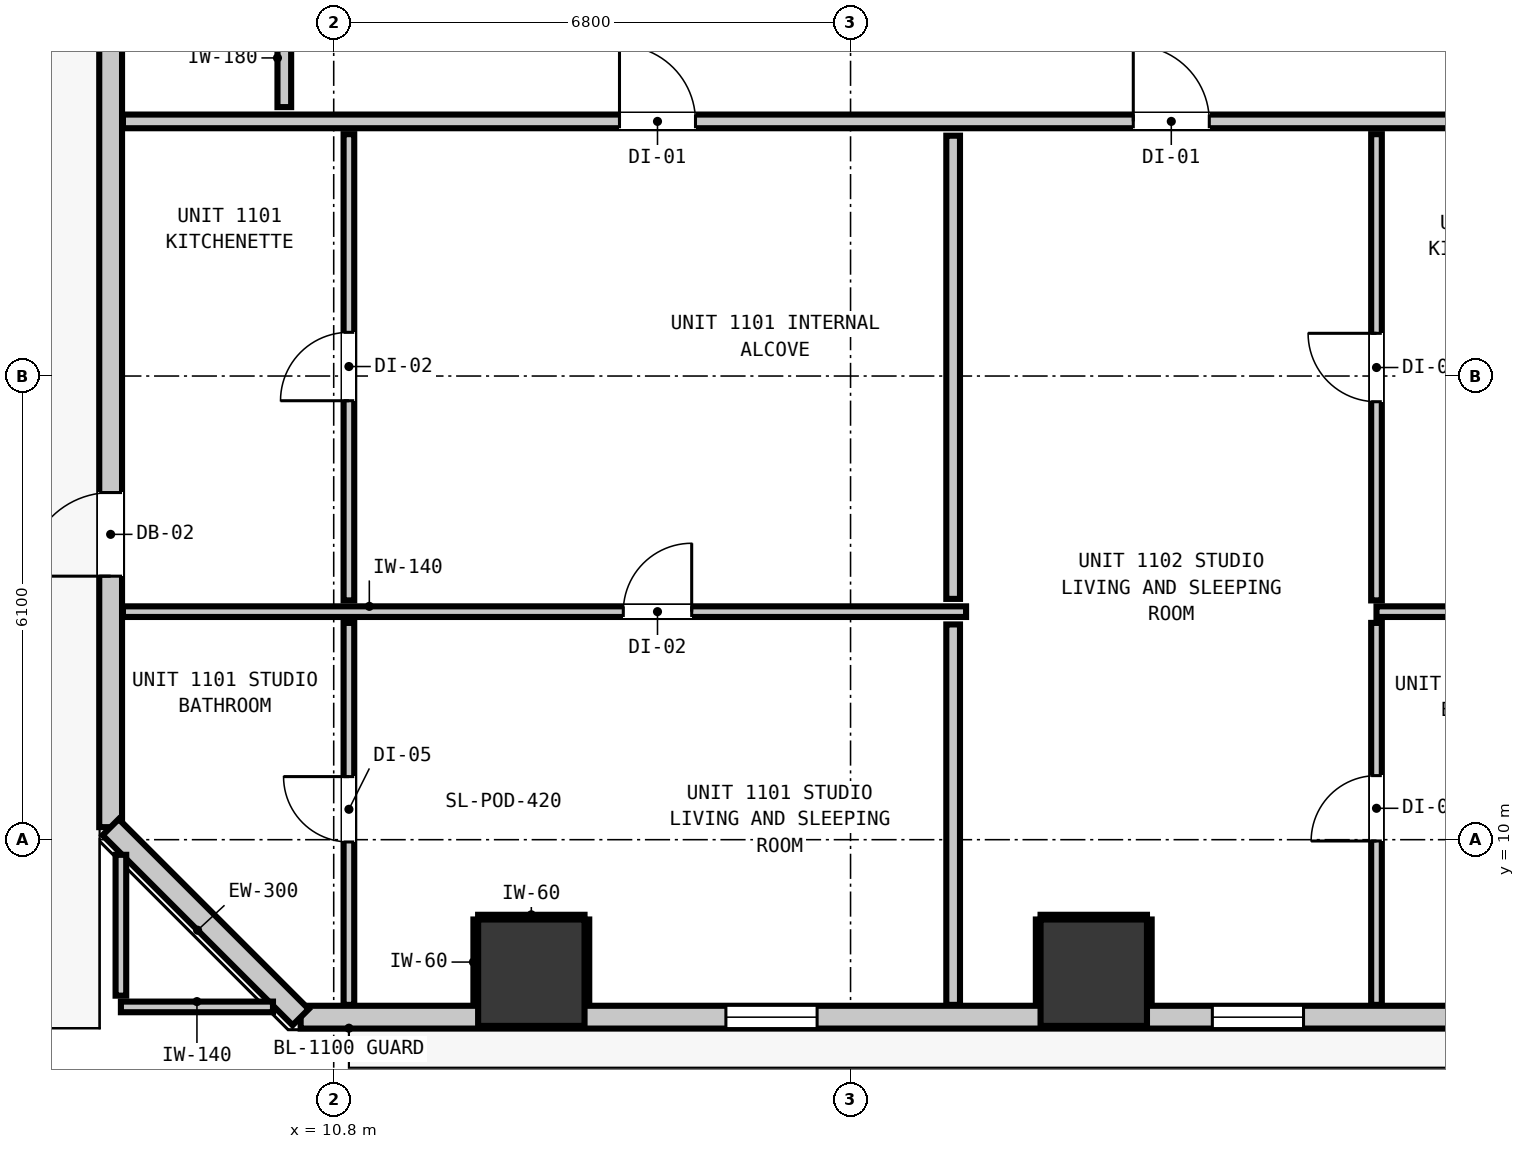
"""IFC4 building model, lengths in metres.
Left out: names, types, materials, properties, quantities, classifications, styles, units other than length and angle.
Written with IfcOpenShell. Run it as: python <this file> out.ifc"""

import sys

from ifc_helpers import new_model, si_unit, direction, frame, frame_2d, origin, origin_2d, place, context, subcontext, project, spatial, rectangle, extrude, element, fill, save


model = new_model("IFC4")
c1 = context("Model", 3, precision=1e-05, world=origin(), true_north=direction((0.0, 1.0)))
c2 = subcontext(c1, "Body", "Model", "MODEL_VIEW")
j1 = project(units=[si_unit("LENGTHUNIT", "METRE"), si_unit("PLANEANGLEUNIT", "RADIAN")], contexts=[c1])
p1 = place(None, origin())
s1 = spatial("IfcSite", under=j1, at=p1, CompositionType="ELEMENT")
p2 = place(p1, origin())
s2 = spatial("IfcBuilding", under=s1, at=p2, CompositionType="ELEMENT")
p3 = place(p2, frame((0.0, 0.0, 41.92)))
s3 = spatial("IfcBuildingStorey", under=s2, at=p3, CompositionType="ELEMENT", Elevation=41.92)
for number, where, z_axis, x_axis in (
    (1, (13.4, 8.25, -0.2), (0.0, 0.0, 1.0), (1.0, 0.0, 0.0)),
    (2, (20.8, 8.25, -0.2), (0.0, 0.0, 1.0), (1.0, 0.0, 0.0)),
):
    element("IfcColumn", number, at=place(p3, frame(where, z_axis=z_axis, x_axis=x_axis)), inside=s3, PredefinedType="COLUMN", context=c2, shape_type="SweptSolid", body=[
        extrude(rectangle(XDim=1.4, YDim=1.4, at=origin_2d()), origin(), (0.0, 0.0, 1.0), 3.52),
    ])
p4 = place(p3, frame((7.865, 10.165, 0.0), z_axis=(0.0, 0.0, 1.0), x_axis=(0.0, 1.0, 0.0)))
e3 = element("IfcWall", 3, at=p4, inside=s3, PredefinedType="STANDARD", context=c2, shape_type="SweptSolid", body=[
    extrude(rectangle(XDim=34.67, YDim=0.3, at=frame_2d((17.335, 0.0))), origin(), (0.0, 0.0, 1.0), 3.06),
])
p5 = place(p4, frame((3.302, 0.0, 0.0)))
e4 = element("IfcOpeningElement", 4, at=p5, cuts=e3, PredefinedType="OPENING", context=c2, shape_type="SweptSolid", body=[
    extrude(rectangle(XDim=1.1, YDim=2.15, at=frame_2d((0.55, 1.075))), frame((0.0, 0.16, 0.0), z_axis=(0.0, -1.0, 0.0), x_axis=(1.0, 0.0, 0.0)), (0.0, 0.0, 1.0), 0.32),
])
p6 = place(p3, frame((47.835, 7.665, 0.0), z_axis=(0.0, 0.0, 1.0), x_axis=(-1.0, 0.0, 0.0)))
e5 = element("IfcWall", 5, at=p6, inside=s3, PredefinedType="STANDARD", context=c2, shape_type="SweptSolid", body=[
    extrude(rectangle(XDim=37.47, YDim=0.3, at=frame_2d((18.735, 0.0))), origin(), (0.0, 0.0, 1.0), 3.06),
])
p7 = place(p6, frame((1.251, 0.0, 0.0)))
e6 = element("IfcOpeningElement", 6, at=p7, cuts=e5, PredefinedType="OPENING", context=c2, shape_type="SweptSolid", body=[
    extrude(rectangle(XDim=1.0, YDim=2.15, at=frame_2d((0.5, 1.075))), frame((0.0, 0.16, 0.0), z_axis=(0.0, -1.0, 0.0), x_axis=(1.0, 0.0, 0.0)), (0.0, 0.0, 1.0), 0.32),
])
p8 = place(p6, frame((30.675, 0.0, 0.85)))
e7 = element("IfcOpeningElement", 7, at=p8, cuts=e5, PredefinedType="OPENING", context=c2, shape_type="SweptSolid", body=[
    extrude(rectangle(XDim=1.2, YDim=1.8, at=frame_2d((0.6, 0.9))), frame((0.0, 0.16, 0.0), z_axis=(0.0, -1.0, 0.0), x_axis=(1.0, 0.0, 0.0)), (0.0, 0.0, 1.0), 0.32),
])
p9 = place(p6, frame((24.275, 0.0, 0.85)))
e8 = element("IfcOpeningElement", 8, at=p9, cuts=e5, PredefinedType="OPENING", context=c2, shape_type="SweptSolid", body=[
    extrude(rectangle(XDim=1.2, YDim=1.8, at=frame_2d((0.6, 0.9))), frame((0.0, 0.16, 0.0), z_axis=(0.0, -1.0, 0.0), x_axis=(1.0, 0.0, 0.0)), (0.0, 0.0, 1.0), 0.32),
])
p10 = place(p6, frame((14.269, 0.0, 0.85)))
e9 = element("IfcOpeningElement", 9, at=p10, cuts=e5, PredefinedType="OPENING", context=c2, shape_type="SweptSolid", body=[
    extrude(rectangle(XDim=1.2, YDim=1.8, at=frame_2d((0.6, 0.9))), frame((0.0, 0.16, 0.0), z_axis=(0.0, -1.0, 0.0), x_axis=(1.0, 0.0, 0.0)), (0.0, 0.0, 1.0), 0.32),
])
p11 = place(p6, frame((17.139, 0.0, 0.85)))
e10 = element("IfcOpeningElement", 10, at=p11, cuts=e5, PredefinedType="OPENING", context=c2, shape_type="SweptSolid", body=[
    extrude(rectangle(XDim=0.58, YDim=1.5, at=frame_2d((0.29, 0.75))), frame((0.0, 0.16, 0.0), z_axis=(0.0, -1.0, 0.0), x_axis=(1.0, 0.0, 0.0)), (0.0, 0.0, 1.0), 0.32),
])
p12 = place(p6, frame((9.356, 0.0, 0.85)))
e11 = element("IfcOpeningElement", 11, at=p12, cuts=e5, PredefinedType="OPENING", context=c2, shape_type="SweptSolid", body=[
    extrude(rectangle(XDim=1.05, YDim=1.65, at=frame_2d((0.525, 0.825))), frame((0.0, 0.16, 0.0), z_axis=(0.0, -1.0, 0.0), x_axis=(1.0, 0.0, 0.0)), (0.0, 0.0, 1.0), 0.32),
])
p13 = place(p6, frame((5.089, 0.0, 0.85)))
e12 = element("IfcOpeningElement", 12, at=p13, cuts=e5, PredefinedType="OPENING", context=c2, shape_type="SweptSolid", body=[
    extrude(rectangle(XDim=1.2, YDim=1.8, at=frame_2d((0.6, 0.9))), frame((0.0, 0.16, 0.0), z_axis=(0.0, -1.0, 0.0), x_axis=(1.0, 0.0, 0.0)), (0.0, 0.0, 1.0), 0.32),
])
p14 = place(p3, frame((10.365, 7.665, 0.0), z_axis=(0.0, 0.0, 1.0), x_axis=(-0.707106781187, 0.707106781187, 0.0)))
e13 = element("IfcWall", 13, at=p14, inside=s3, PredefinedType="STANDARD", context=c2, shape_type="SweptSolid", body=[
    extrude(rectangle(XDim=3.536, YDim=0.3, at=frame_2d((1.768, 0.0))), origin(), (0.0, 0.0, 1.0), 3.06),
])
p15 = place(p3, frame((8.027, 19.45, 0.0), z_axis=(0.0, 0.0, 1.0), x_axis=(1.0, 0.0, 0.0)))
e14 = element("IfcWall", 14, at=p15, inside=s3, PredefinedType="PARTITIONING", context=c2, shape_type="SweptSolid", body=[
    extrude(rectangle(XDim=42.146, YDim=0.18, at=frame_2d((21.073, 0.0))), origin(), (0.0, 0.0, 1.0), 3.06),
])
p16 = place(p15, frame((6.533, 0.0, 0.0)))
e15 = element("IfcOpeningElement", 15, at=p16, cuts=e14, PredefinedType="OPENING", context=c2, shape_type="SweptSolid", body=[
    extrude(rectangle(XDim=1.0, YDim=2.15, at=frame_2d((0.5, 1.075))), frame((0.0, 0.1, 0.0), z_axis=(0.0, -1.0, 0.0), x_axis=(1.0, 0.0, 0.0)), (0.0, 0.0, 1.0), 0.2),
])
p17 = place(p15, frame((13.293, 0.0, 0.0)))
e16 = element("IfcOpeningElement", 16, at=p17, cuts=e14, PredefinedType="OPENING", context=c2, shape_type="SweptSolid", body=[
    extrude(rectangle(XDim=1.0, YDim=2.15, at=frame_2d((0.5, 1.075))), frame((0.0, 0.1, 0.0), z_axis=(0.0, -1.0, 0.0), x_axis=(1.0, 0.0, 0.0)), (0.0, 0.0, 1.0), 0.2),
])
p18 = place(p15, frame((24.439, 0.0, 0.0)))
e17 = element("IfcOpeningElement", 17, at=p18, cuts=e14, PredefinedType="OPENING", context=c2, shape_type="SweptSolid", body=[
    extrude(rectangle(XDim=1.0, YDim=2.15, at=frame_2d((0.5, 1.075))), frame((0.0, 0.1, 0.0), z_axis=(0.0, -1.0, 0.0), x_axis=(1.0, 0.0, 0.0)), (0.0, 0.0, 1.0), 0.2),
])
p19 = place(p15, frame((34.477, 0.0, 0.0)))
e18 = element("IfcOpeningElement", 18, at=p19, cuts=e14, PredefinedType="OPENING", context=c2, shape_type="SweptSolid", body=[
    extrude(rectangle(XDim=1.0, YDim=2.15, at=frame_2d((0.5, 1.075))), frame((0.0, 0.1, 0.0), z_axis=(0.0, -1.0, 0.0), x_axis=(1.0, 0.0, 0.0)), (0.0, 0.0, 1.0), 0.2),
])
p20 = place(p3, frame((8.0, 7.8, 0.0), z_axis=(0.0, 0.0, 1.0), x_axis=(1.0, 0.0, 0.0)))
e19 = element("IfcWall", 19, at=p20, inside=s3, PredefinedType="PARTITIONING", context=c2, shape_type="SweptSolid", body=[
    extrude(rectangle(XDim=2.001, YDim=0.14, at=frame_2d((1.0, 0.0))), origin(), (0.0, 0.0, 1.0), 3.06),
])
p21 = place(p3, frame((8.027, 13.0, 0.0), z_axis=(0.0, 0.0, 1.0), x_axis=(1.0, 0.0, 0.0)))
e20 = element("IfcWall", 20, at=p21, inside=s3, PredefinedType="PARTITIONING", context=c2, shape_type="SweptSolid", body=[
    extrude(rectangle(XDim=11.093, YDim=0.14, at=frame_2d((5.546, 0.0))), origin(), (0.0, 0.0, 1.0), 3.06),
])
p22 = place(p21, frame((6.583, 0.0, 0.0)))
e21 = element("IfcOpeningElement", 21, at=p22, cuts=e20, PredefinedType="OPENING", context=c2, shape_type="SweptSolid", body=[
    extrude(rectangle(XDim=0.9, YDim=2.1, at=frame_2d((0.45, 1.05))), frame((0.0, 0.08, 0.0), z_axis=(0.0, -1.0, 0.0), x_axis=(1.0, 0.0, 0.0)), (0.0, 0.0, 1.0), 0.16),
])
p23 = place(p3, frame((24.52, 13.0, 0.0), z_axis=(0.0, 0.0, 1.0), x_axis=(1.0, 0.0, 0.0)))
e22 = element("IfcWall", 22, at=p23, inside=s3, PredefinedType="PARTITIONING", context=c2, shape_type="SweptSolid", body=[
    extrude(rectangle(XDim=6.492, YDim=0.14, at=frame_2d((3.246, 0.0))), origin(), (0.0, 0.0, 1.0), 3.06),
])
p24 = place(p3, frame((10.15, 19.638, 0.0), z_axis=(0.0, 0.0, 1.0), x_axis=(0.0, 1.0, 0.0)))
e23 = element("IfcWall", 23, at=p24, inside=s3, PredefinedType="PARTITIONING", context=c2, shape_type="SweptSolid", body=[
    extrude(rectangle(XDim=1.294, YDim=0.18, at=frame_2d((0.647, 0.0))), origin(), (0.0, 0.0, 1.0), 3.06),
])
p25 = place(p3, frame((18.95, 7.827, 0.0), z_axis=(0.0, 0.0, 1.0), x_axis=(0.0, 1.0, 0.0)))
e24 = element("IfcWall", 24, at=p25, inside=s3, PredefinedType="PARTITIONING", context=c2, shape_type="SweptSolid", body=[
    extrude(rectangle(XDim=5.005, YDim=0.18, at=frame_2d((2.502, 0.0))), origin(), (0.0, 0.0, 1.0), 3.06),
])
p26 = place(p3, frame((18.95, 13.168, 0.0), z_axis=(0.0, 0.0, 1.0), x_axis=(0.0, 1.0, 0.0)))
e25 = element("IfcWall", 25, at=p26, inside=s3, PredefinedType="PARTITIONING", context=c2, shape_type="SweptSolid", body=[
    extrude(rectangle(XDim=6.094, YDim=0.18, at=frame_2d((3.047, 0.0))), origin(), (0.0, 0.0, 1.0), 3.06),
])
p27 = place(p3, frame((8.0, 7.948, 0.0), z_axis=(0.0, 0.0, 1.0), x_axis=(0.0, 1.0, 0.0)))
e26 = element("IfcWall", 26, at=p27, inside=s3, PredefinedType="PARTITIONING", context=c2, shape_type="SweptSolid", body=[
    extrude(rectangle(XDim=1.853, YDim=0.14, at=frame_2d((0.927, 0.0))), origin(), (0.0, 0.0, 1.0), 3.06),
])
p28 = place(p3, frame((11.0, 7.827, 0.0), z_axis=(0.0, 0.0, 1.0), x_axis=(0.0, 1.0, 0.0)))
e27 = element("IfcWall", 27, at=p28, inside=s3, PredefinedType="PARTITIONING", context=c2, shape_type="SweptSolid", body=[
    extrude(rectangle(XDim=5.025, YDim=0.14, at=frame_2d((2.513, 0.0))), origin(), (0.0, 0.0, 1.0), 3.06),
])
p29 = place(p28, frame((2.143, 0.0, 0.0)))
e28 = element("IfcOpeningElement", 28, at=p29, cuts=e27, PredefinedType="OPENING", context=c2, shape_type="SweptSolid", body=[
    extrude(rectangle(XDim=0.86, YDim=2.02, at=frame_2d((0.43, 1.01))), frame((0.0, 0.08, 0.0), z_axis=(0.0, -1.0, 0.0), x_axis=(1.0, 0.0, 0.0)), (0.0, 0.0, 1.0), 0.16),
])
p30 = place(p3, frame((11.0, 13.148, 0.0), z_axis=(0.0, 0.0, 1.0), x_axis=(0.0, 1.0, 0.0)))
e29 = element("IfcWall", 29, at=p30, inside=s3, PredefinedType="PARTITIONING", context=c2, shape_type="SweptSolid", body=[
    extrude(rectangle(XDim=6.134, YDim=0.14, at=frame_2d((3.067, 0.0))), origin(), (0.0, 0.0, 1.0), 2.445),
])
p31 = place(p30, frame((2.627, 0.0, 0.0)))
e30 = element("IfcOpeningElement", 30, at=p31, cuts=e29, PredefinedType="OPENING", context=c2, shape_type="SweptSolid", body=[
    extrude(rectangle(XDim=0.9, YDim=2.1, at=frame_2d((0.45, 1.05))), frame((0.0, 0.08, 0.0), z_axis=(0.0, -1.0, 0.0), x_axis=(1.0, 0.0, 0.0)), (0.0, 0.0, 1.0), 0.16),
])
p32 = place(p3, frame((24.52, 7.827, 0.0), z_axis=(0.0, 0.0, 1.0), x_axis=(0.0, 1.0, 0.0)))
e31 = element("IfcWall", 31, at=p32, inside=s3, PredefinedType="PARTITIONING", context=c2, shape_type="SweptSolid", body=[
    extrude(rectangle(XDim=5.025, YDim=0.14, at=frame_2d((2.513, 0.0))), origin(), (0.0, 0.0, 1.0), 3.06),
])
p33 = place(p32, frame((2.156, 0.0, 0.0)))
e32 = element("IfcOpeningElement", 32, at=p33, cuts=e31, PredefinedType="OPENING", context=c2, shape_type="SweptSolid", body=[
    extrude(rectangle(XDim=0.86, YDim=2.02, at=frame_2d((0.43, 1.01))), frame((0.0, 0.08, 0.0), z_axis=(0.0, -1.0, 0.0), x_axis=(1.0, 0.0, 0.0)), (0.0, 0.0, 1.0), 0.16),
])
p34 = place(p3, frame((24.52, 13.148, 0.0), z_axis=(0.0, 0.0, 1.0), x_axis=(0.0, 1.0, 0.0)))
e33 = element("IfcWall", 33, at=p34, inside=s3, PredefinedType="PARTITIONING", context=c2, shape_type="SweptSolid", body=[
    extrude(rectangle(XDim=6.134, YDim=0.14, at=frame_2d((3.067, 0.0))), origin(), (0.0, 0.0, 1.0), 3.06),
])
p35 = place(p34, frame((2.614, 0.0, 0.0)))
e34 = element("IfcOpeningElement", 34, at=p35, cuts=e33, PredefinedType="OPENING", context=c2, shape_type="SweptSolid", body=[
    extrude(rectangle(XDim=0.9, YDim=2.1, at=frame_2d((0.45, 1.05))), frame((0.0, 0.08, 0.0), z_axis=(0.0, -1.0, 0.0), x_axis=(1.0, 0.0, 0.0)), (0.0, 0.0, 1.0), 0.16),
])
p36 = place(p3, frame((12.7, 8.982, 0.0), z_axis=(0.0, 0.0, 1.0), x_axis=(1.0, 0.0, 0.0)))
e35 = element("IfcWall", 35, at=p36, inside=s3, PredefinedType="PARTITIONING", context=c2, shape_type="SweptSolid", body=[
    extrude(rectangle(XDim=1.4, YDim=0.06, at=frame_2d((0.7, 0.0))), origin(), (0.0, 0.0, 1.0), 1.45),
])
for number, where, z_axis, x_axis in (
    (36, (12.668, 7.83, 0.0), (0.0, 0.0, 1.0), (0.0, 1.0, 0.0)),
    (37, (14.132, 7.83, 0.0), (0.0, 0.0, 1.0), (0.0, 1.0, 0.0)),
):
    element("IfcWall", number, at=place(p3, frame(where, z_axis=z_axis, x_axis=x_axis)), inside=s3, PredefinedType="PARTITIONING", context=c2, shape_type="SweptSolid", body=[
        extrude(rectangle(XDim=1.12, YDim=0.06, at=frame_2d((0.56, 0.0))), origin(), (0.0, 0.0, 1.0), 1.45),
    ])
p37 = place(p3, frame((20.1, 8.982, 0.0), z_axis=(0.0, 0.0, 1.0), x_axis=(1.0, 0.0, 0.0)))
e38 = element("IfcWall", 38, at=p37, inside=s3, PredefinedType="PARTITIONING", context=c2, shape_type="SweptSolid", body=[
    extrude(rectangle(XDim=1.4, YDim=0.06, at=frame_2d((0.7, 0.0))), origin(), (0.0, 0.0, 1.0), 1.45),
])
for number, where, z_axis, x_axis in (
    (39, (20.068, 7.83, 0.0), (0.0, 0.0, 1.0), (0.0, 1.0, 0.0)),
    (40, (21.532, 7.83, 0.0), (0.0, 0.0, 1.0), (0.0, 1.0, 0.0)),
):
    element("IfcWall", number, at=place(p3, frame(where, z_axis=z_axis, x_axis=x_axis)), inside=s3, PredefinedType="PARTITIONING", context=c2, shape_type="SweptSolid", body=[
        extrude(rectangle(XDim=1.12, YDim=0.06, at=frame_2d((0.56, 0.0))), origin(), (0.0, 0.0, 1.0), 1.45),
    ])
p38 = place(p5, origin())
e41 = element("IfcDoor", 41, at=p38, inside=s3, OperationType="SINGLE_SWING_LEFT", PredefinedType="DOOR", context=c2, shape_type="SweptSolid", body=[
    extrude(rectangle(XDim=1.1, YDim=2.15, at=frame_2d((0.55, 1.075))), frame((0.0, 0.025, 0.0), z_axis=(0.0, -1.0, 0.0), x_axis=(1.0, 0.0, 0.0)), (0.0, 0.0, 1.0), 0.05),
])
fill(e4, e41)
p39 = place(p8, origin())
e42 = element("IfcWindow", 42, at=p39, inside=s3, PartitioningType="SINGLE_PANEL", PredefinedType="WINDOW", context=c2, shape_type="SweptSolid", body=[
    extrude(rectangle(XDim=1.2, YDim=1.8, at=frame_2d((0.6, 0.9))), frame((0.0, 0.03, 0.0), z_axis=(0.0, -1.0, 0.0), x_axis=(1.0, 0.0, 0.0)), (0.0, 0.0, 1.0), 0.06),
])
fill(e7, e42)
p40 = place(p9, origin())
e43 = element("IfcWindow", 43, at=p40, inside=s3, PartitioningType="SINGLE_PANEL", PredefinedType="WINDOW", context=c2, shape_type="SweptSolid", body=[
    extrude(rectangle(XDim=1.2, YDim=1.8, at=frame_2d((0.6, 0.9))), frame((0.0, 0.03, 0.0), z_axis=(0.0, -1.0, 0.0), x_axis=(1.0, 0.0, 0.0)), (0.0, 0.0, 1.0), 0.06),
])
fill(e8, e43)
p41 = place(p16, origin())
e44 = element("IfcDoor", 44, at=p41, inside=s3, OperationType="SINGLE_SWING_LEFT", PredefinedType="DOOR", context=c2, shape_type="SweptSolid", body=[
    extrude(rectangle(XDim=1.0, YDim=2.15, at=frame_2d((0.5, 1.075))), frame((0.0, 0.025, 0.0), z_axis=(0.0, -1.0, 0.0), x_axis=(1.0, 0.0, 0.0)), (0.0, 0.0, 1.0), 0.05),
])
fill(e15, e44)
p42 = place(p22, origin())
e45 = element("IfcDoor", 45, at=p42, inside=s3, OperationType="SINGLE_SWING_RIGHT", PredefinedType="DOOR", context=c2, shape_type="SweptSolid", body=[
    extrude(rectangle(XDim=0.9, YDim=2.1, at=frame_2d((0.45, 1.05))), frame((0.0, 0.025, 0.0), z_axis=(0.0, -1.0, 0.0), x_axis=(1.0, 0.0, 0.0)), (0.0, 0.0, 1.0), 0.05),
])
fill(e21, e45)
p43 = place(p31, origin())
e46 = element("IfcDoor", 46, at=p43, inside=s3, OperationType="SINGLE_SWING_LEFT", PredefinedType="DOOR", context=c2, shape_type="SweptSolid", body=[
    extrude(rectangle(XDim=0.9, YDim=2.1, at=frame_2d((0.45, 1.05))), frame((0.0, 0.025, 0.0), z_axis=(0.0, -1.0, 0.0), x_axis=(1.0, 0.0, 0.0)), (0.0, 0.0, 1.0), 0.05),
])
fill(e30, e46)
p44 = place(p29, origin())
e47 = element("IfcDoor", 47, at=p44, inside=s3, OperationType="SINGLE_SWING_RIGHT", PredefinedType="DOOR", context=c2, shape_type="SweptSolid", body=[
    extrude(rectangle(XDim=0.86, YDim=2.02, at=frame_2d((0.43, 1.01))), frame((0.0, 0.025, 0.0), z_axis=(0.0, -1.0, 0.0), x_axis=(1.0, 0.0, 0.0)), (0.0, 0.0, 1.0), 0.05),
])
fill(e28, e47)
p45 = place(p17, origin())
e48 = element("IfcDoor", 48, at=p45, inside=s3, OperationType="SINGLE_SWING_LEFT", PredefinedType="DOOR", context=c2, shape_type="SweptSolid", body=[
    extrude(rectangle(XDim=1.0, YDim=2.15, at=frame_2d((0.5, 1.075))), frame((0.0, 0.025, 0.0), z_axis=(0.0, -1.0, 0.0), x_axis=(1.0, 0.0, 0.0)), (0.0, 0.0, 1.0), 0.05),
])
fill(e16, e48)
p46 = place(p35, origin())
e49 = element("IfcDoor", 49, at=p46, inside=s3, OperationType="SINGLE_SWING_RIGHT", PredefinedType="DOOR", context=c2, shape_type="SweptSolid", body=[
    extrude(rectangle(XDim=0.9, YDim=2.1, at=frame_2d((0.45, 1.05))), frame((0.0, 0.025, 0.0), z_axis=(0.0, -1.0, 0.0), x_axis=(1.0, 0.0, 0.0)), (0.0, 0.0, 1.0), 0.05),
])
fill(e34, e49)
p47 = place(p33, origin())
e50 = element("IfcDoor", 50, at=p47, inside=s3, OperationType="SINGLE_SWING_LEFT", PredefinedType="DOOR", context=c2, shape_type="SweptSolid", body=[
    extrude(rectangle(XDim=0.86, YDim=2.02, at=frame_2d((0.43, 1.01))), frame((0.0, 0.025, 0.0), z_axis=(0.0, -1.0, 0.0), x_axis=(1.0, 0.0, 0.0)), (0.0, 0.0, 1.0), 0.05),
])
fill(e32, e50)
save(model, sys.argv[1])
